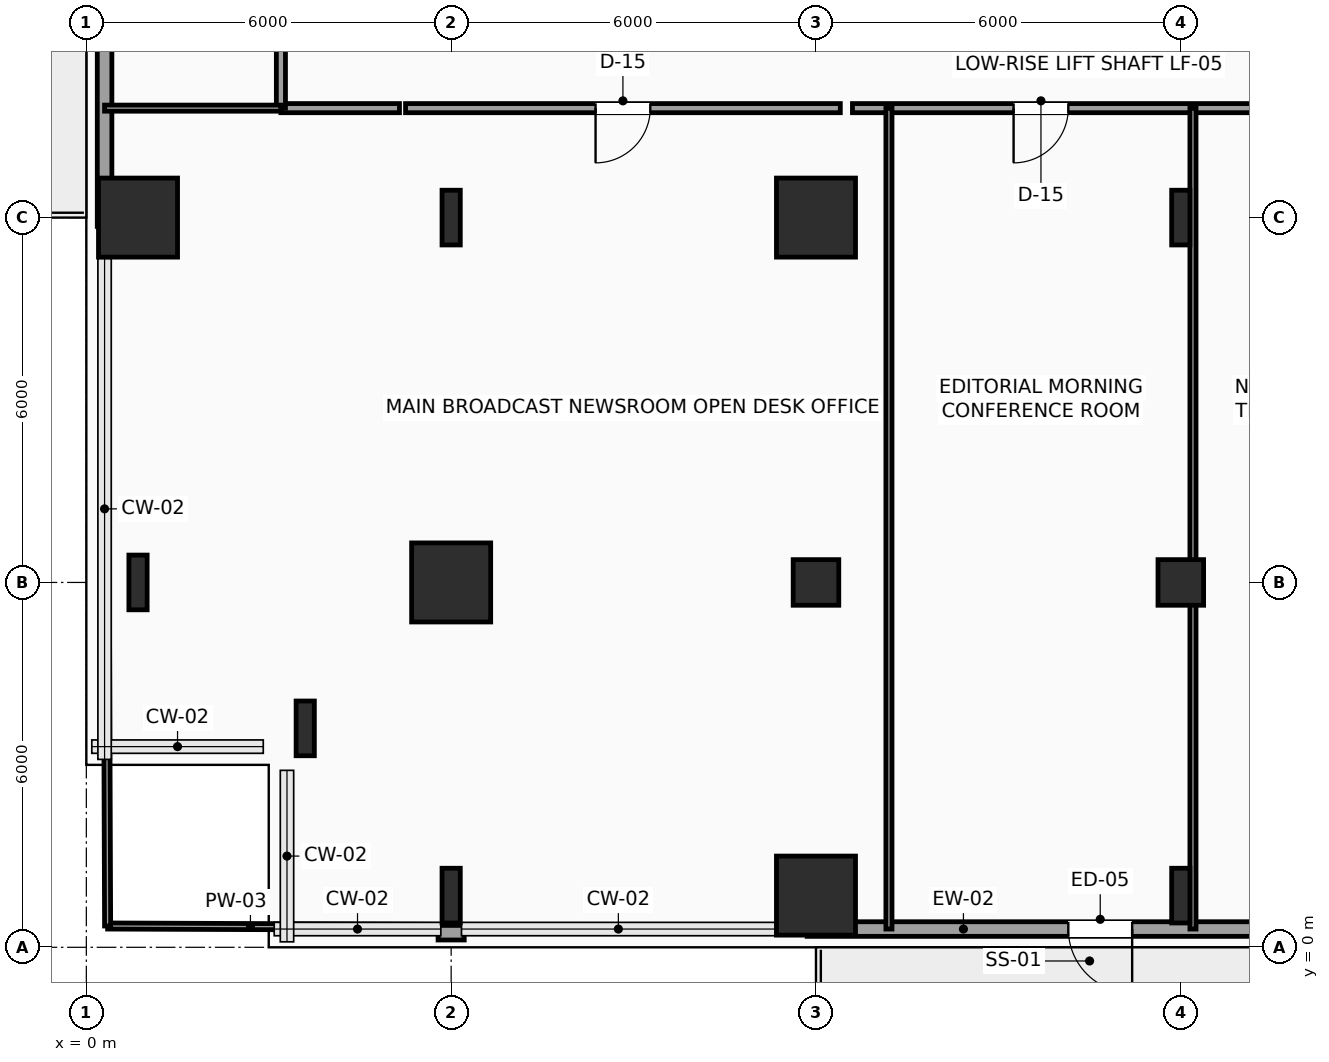
"""IFC4 building model, lengths in metres.
Left out: names, types, materials, properties, quantities, classifications, styles, units other than length and angle.
Written with IfcOpenShell. Run it as: python <this file> out.ifc"""

import sys

from ifc_helpers import new_model, si_unit, direction, frame, frame_2d, origin, origin_2d, place, context, subcontext, project, spatial, rectangle, hollow_rectangle, i_section, extrude, element, fill, save


model = new_model("IFC4")
c1 = context("Model", 3, precision=1e-05, world=origin(), true_north=direction((0.0, 1.0)))
c2 = subcontext(c1, "Body", "Model", "MODEL_VIEW")
j1 = project(units=[si_unit("LENGTHUNIT", "METRE"), si_unit("PLANEANGLEUNIT", "RADIAN")], contexts=[c1])
p1 = place(None, origin())
s1 = spatial("IfcSite", under=j1, at=p1, CompositionType="ELEMENT")
p2 = place(p1, origin())
s2 = spatial("IfcBuilding", under=s1, at=p2, CompositionType="ELEMENT")
p3 = place(p2, frame((0.0, 0.0, 36.3)))
s3 = spatial("IfcBuildingStorey", under=s2, at=p3, CompositionType="ELEMENT", Elevation=36.3)
for number, where, z_axis, x_axis in (
    (1, (3.6, 3.6, 0.0), (0.0, 0.0, 1.0), (1.0, 0.0, 0.0)),
    (2, (0.85, 6.0, 0.0), (0.0, 0.0, 1.0), (1.0, 0.0, 0.0)),
):
    element("IfcColumn", number, at=place(p3, frame(where, z_axis=z_axis, x_axis=x_axis)), inside=s3, PredefinedType="COLUMN", context=c2, shape_type="SweptSolid", body=[
        extrude(i_section(OverallWidth=0.3, OverallDepth=0.9, WebThickness=0.019, FlangeThickness=0.035, FilletRadius=0.03, at=origin_2d()), origin(), (0.0, 0.0, 1.0), 3.9),
    ])
p4 = place(p3, frame((0.85, 12.0, 0.0), z_axis=(0.0, 0.0, 1.0), x_axis=(1.0, 0.0, 0.0)))
e3 = element("IfcColumn", 3, at=p4, inside=s3, PredefinedType="COLUMN", context=c2, shape_type="SweptSolid", body=[
    extrude(rectangle(XDim=1.3, YDim=1.3, at=origin_2d()), origin(), (0.0, 0.0, 1.0), 3.9),
])
p5 = place(p3, frame((6.0, 0.85, 0.0), z_axis=(0.0, 0.0, 1.0), x_axis=(1.0, 0.0, 0.0)))
e4 = element("IfcColumn", 4, at=p5, inside=s3, PredefinedType="COLUMN", context=c2, shape_type="SweptSolid", body=[
    extrude(i_section(OverallWidth=0.3, OverallDepth=0.9, WebThickness=0.019, FlangeThickness=0.035, FilletRadius=0.03, at=origin_2d()), origin(), (0.0, 0.0, 1.0), 3.9),
])
p6 = place(p3, frame((6.0, 6.0, 0.0), z_axis=(0.0, 0.0, 1.0), x_axis=(1.0, 0.0, 0.0)))
e5 = element("IfcColumn", 5, at=p6, inside=s3, PredefinedType="COLUMN", context=c2, shape_type="SweptSolid", body=[
    extrude(rectangle(XDim=1.3, YDim=1.3, at=origin_2d()), origin(), (0.0, 0.0, 1.0), 3.9),
])
p7 = place(p3, frame((6.0, 12.0, 0.0), z_axis=(0.0, 0.0, 1.0), x_axis=(1.0, 0.0, 0.0)))
e6 = element("IfcColumn", 6, at=p7, inside=s3, PredefinedType="COLUMN", context=c2, shape_type="SweptSolid", body=[
    extrude(i_section(OverallWidth=0.3, OverallDepth=0.9, WebThickness=0.019, FlangeThickness=0.035, FilletRadius=0.03, at=origin_2d()), origin(), (0.0, 0.0, 1.0), 3.9),
])
p8 = place(p3, frame((12.0, 0.85, 0.0), z_axis=(0.0, 0.0, 1.0), x_axis=(1.0, 0.0, 0.0)))
e7 = element("IfcColumn", 7, at=p8, inside=s3, PredefinedType="COLUMN", context=c2, shape_type="SweptSolid", body=[
    extrude(rectangle(XDim=1.3, YDim=1.3, at=origin_2d()), origin(), (0.0, 0.0, 1.0), 3.9),
])
p9 = place(p3, frame((12.0, 6.0, 0.0), z_axis=(0.0, 0.0, 1.0), x_axis=(1.0, 0.0, 0.0)))
e8 = element("IfcColumn", 8, at=p9, inside=s3, PredefinedType="COLUMN", context=c2, shape_type="SweptSolid", body=[
    extrude(hollow_rectangle(XDim=0.75, YDim=0.75, WallThickness=0.035, InnerFilletRadius=0.035, OuterFilletRadius=0.05, at=origin_2d()), origin(), (0.0, 0.0, 1.0), 3.9),
])
p10 = place(p3, frame((12.0, 12.0, 0.0), z_axis=(0.0, 0.0, 1.0), x_axis=(1.0, 0.0, 0.0)))
e9 = element("IfcColumn", 9, at=p10, inside=s3, PredefinedType="COLUMN", context=c2, shape_type="SweptSolid", body=[
    extrude(rectangle(XDim=1.3, YDim=1.3, at=origin_2d()), origin(), (0.0, 0.0, 1.0), 3.9),
])
p11 = place(p3, frame((18.0, 0.85, 0.0), z_axis=(0.0, 0.0, 1.0), x_axis=(1.0, 0.0, 0.0)))
e10 = element("IfcColumn", 10, at=p11, inside=s3, PredefinedType="COLUMN", context=c2, shape_type="SweptSolid", body=[
    extrude(i_section(OverallWidth=0.3, OverallDepth=0.9, WebThickness=0.019, FlangeThickness=0.035, FilletRadius=0.03, at=origin_2d()), origin(), (0.0, 0.0, 1.0), 3.9),
])
p12 = place(p3, frame((18.0, 6.0, 0.0), z_axis=(0.0, 0.0, 1.0), x_axis=(1.0, 0.0, 0.0)))
e11 = element("IfcColumn", 11, at=p12, inside=s3, PredefinedType="COLUMN", context=c2, shape_type="SweptSolid", body=[
    extrude(hollow_rectangle(XDim=0.75, YDim=0.75, WallThickness=0.035, InnerFilletRadius=0.035, OuterFilletRadius=0.05, at=origin_2d()), origin(), (0.0, 0.0, 1.0), 3.9),
])
p13 = place(p3, frame((18.0, 12.0, 0.0), z_axis=(0.0, 0.0, 1.0), x_axis=(1.0, 0.0, 0.0)))
e12 = element("IfcColumn", 12, at=p13, inside=s3, PredefinedType="COLUMN", context=c2, shape_type="SweptSolid", body=[
    extrude(i_section(OverallWidth=0.3, OverallDepth=0.9, WebThickness=0.019, FlangeThickness=0.035, FilletRadius=0.03, at=origin_2d()), origin(), (0.0, 0.0, 1.0), 3.9),
])
p14 = place(p3, frame((21.145, 0.3, 0.0), z_axis=(0.0, 0.0, 1.0), x_axis=(-1.0, 0.0, 0.0)))
e13 = element("IfcWall", 13, at=p14, inside=s3, PredefinedType="SOLIDWALL", context=c2, shape_type="SweptSolid", body=[
    extrude(rectangle(XDim=9.29, YDim=0.24, at=frame_2d((4.645, 0.0))), origin(), (0.0, 0.0, 1.0), 3.65),
])
p15 = place(p14, frame((3.945, 0.0, 0.0)))
e14 = element("IfcOpeningElement", 14, at=p15, cuts=e13, PredefinedType="OPENING", context=c2, shape_type="SweptSolid", body=[
    extrude(rectangle(XDim=1.05, YDim=2.2, at=frame_2d((0.525, 1.1))), frame((0.0, 0.13, 0.0), z_axis=(0.0, -1.0, 0.0), x_axis=(1.0, 0.0, 0.0)), (0.0, 0.0, 1.0), 0.26),
])
p16 = place(p3, frame((0.3, 11.855, 0.0), z_axis=(0.0, 0.0, 1.0), x_axis=(0.0, 1.0, 0.0)))
e15 = element("IfcWall", 15, at=p16, inside=s3, PredefinedType="SOLIDWALL", context=c2, shape_type="SweptSolid", body=[
    extrude(rectangle(XDim=9.29, YDim=0.24, at=frame_2d((4.645, 0.0))), origin(), (0.0, 0.0, 1.0), 3.65),
])
p17 = place(p16, frame((3.945, 0.0, 0.0)))
e16 = element("IfcOpeningElement", 16, at=p17, cuts=e15, PredefinedType="OPENING", context=c2, shape_type="SweptSolid", body=[
    extrude(rectangle(XDim=1.05, YDim=2.2, at=frame_2d((0.525, 1.1))), frame((0.0, 0.13, 0.0), z_axis=(0.0, -1.0, 0.0), x_axis=(1.0, 0.0, 0.0)), (0.0, 0.0, 1.0), 0.26),
])
p18 = place(p3, frame((6.215, 0.24, 0.0), z_axis=(0.0, 0.0, 1.0), x_axis=(-1.0, 0.0, 0.0)))
e17 = element("IfcWall", 17, at=p18, inside=s3, PredefinedType="SOLIDWALL", context=c2, shape_type="SweptSolid", body=[
    extrude(rectangle(XDim=0.43, YDim=0.24, at=frame_2d((0.215, 0.0))), origin(), (0.0, 0.0, 1.0), 3.65),
])
p19 = place(p3, frame((21.55, 13.8, 0.0), z_axis=(0.0, 0.0, 1.0), x_axis=(-1.0, 0.0, 0.0)))
e18 = element("IfcWall", 18, at=p19, inside=s3, PredefinedType="PARTITIONING", context=c2, shape_type="SweptSolid", body=[
    extrude(rectangle(XDim=8.95, YDim=0.15, at=frame_2d((4.475, 0.0))), origin(), (0.0, 0.0, 1.0), 3.65),
])
p20 = place(p19, frame((5.4, 0.0, 0.0)))
e19 = element("IfcOpeningElement", 19, at=p20, cuts=e18, PredefinedType="OPENING", context=c2, shape_type="SweptSolid", body=[
    extrude(rectangle(XDim=0.9, YDim=2.1, at=frame_2d((0.45, 1.05))), frame((0.0, 0.085, 0.0), z_axis=(0.0, -1.0, 0.0), x_axis=(1.0, 0.0, 0.0)), (0.0, 0.0, 1.0), 0.17),
])
p21 = place(p19, frame((1.225, 0.0, 0.0)))
e20 = element("IfcOpeningElement", 20, at=p21, cuts=e18, PredefinedType="OPENING", context=c2, shape_type="SweptSolid", body=[
    extrude(rectangle(XDim=0.9, YDim=2.1, at=frame_2d((0.45, 1.05))), frame((0.0, 0.085, 0.0), z_axis=(0.0, -1.0, 0.0), x_axis=(1.0, 0.0, 0.0)), (0.0, 0.0, 1.0), 0.17),
])
p22 = place(p3, frame((12.4, 13.8, 0.0), z_axis=(0.0, 0.0, 1.0), x_axis=(-1.0, 0.0, 0.0)))
e21 = element("IfcWall", 21, at=p22, inside=s3, PredefinedType="PARTITIONING", context=c2, shape_type="SweptSolid", body=[
    extrude(rectangle(XDim=7.15, YDim=0.15, at=frame_2d((3.575, 0.0))), origin(), (0.0, 0.0, 1.0), 3.65),
])
p23 = place(p22, frame((3.125, 0.0, 0.0)))
e22 = element("IfcOpeningElement", 22, at=p23, cuts=e21, PredefinedType="OPENING", context=c2, shape_type="SweptSolid", body=[
    extrude(rectangle(XDim=0.9, YDim=2.1, at=frame_2d((0.45, 1.05))), frame((0.0, 0.085, 0.0), z_axis=(0.0, -1.0, 0.0), x_axis=(1.0, 0.0, 0.0)), (0.0, 0.0, 1.0), 0.17),
])
p24 = place(p3, frame((5.15, 13.8, 0.0), z_axis=(0.0, 0.0, 1.0), x_axis=(-1.0, 0.0, 0.0)))
e23 = element("IfcWall", 23, at=p24, inside=s3, PredefinedType="PARTITIONING", context=c2, shape_type="SweptSolid", body=[
    extrude(rectangle(XDim=1.95, YDim=0.15, at=frame_2d((0.975, 0.0))), origin(), (0.0, 0.0, 1.0), 3.65),
])
p25 = place(p3, frame((3.2, 13.8, 0.0), z_axis=(0.0, 0.0, 1.0), x_axis=(0.0, 1.0, 0.0)))
e24 = element("IfcWall", 24, at=p25, inside=s3, PredefinedType="PARTITIONING", context=c2, shape_type="SweptSolid", body=[
    extrude(rectangle(XDim=16.45, YDim=0.15, at=frame_2d((8.225, 0.0))), origin(), (0.0, 0.0, 1.0), 3.65),
])
p26 = place(p25, frame((2.65, 0.0, 0.0)))
e25 = element("IfcOpeningElement", 25, at=p26, cuts=e24, PredefinedType="OPENING", context=c2, shape_type="SweptSolid", body=[
    extrude(rectangle(XDim=0.9, YDim=2.1, at=frame_2d((0.45, 1.05))), frame((0.0, 0.085, 0.0), z_axis=(0.0, -1.0, 0.0), x_axis=(1.0, 0.0, 0.0)), (0.0, 0.0, 1.0), 0.17),
])
p27 = place(p25, frame((8.85, 0.0, 0.0)))
e26 = element("IfcOpeningElement", 26, at=p27, cuts=e24, PredefinedType="OPENING", context=c2, shape_type="SweptSolid", body=[
    extrude(rectangle(XDim=0.9, YDim=2.1, at=frame_2d((0.45, 1.05))), frame((0.0, 0.085, 0.0), z_axis=(0.0, -1.0, 0.0), x_axis=(1.0, 0.0, 0.0)), (0.0, 0.0, 1.0), 0.17),
])
p28 = place(p25, frame((13.975, 0.0, 0.0)))
e27 = element("IfcOpeningElement", 27, at=p28, cuts=e24, PredefinedType="OPENING", context=c2, shape_type="SweptSolid", body=[
    extrude(rectangle(XDim=0.9, YDim=2.1, at=frame_2d((0.45, 1.05))), frame((0.0, 0.085, 0.0), z_axis=(0.0, -1.0, 0.0), x_axis=(1.0, 0.0, 0.0)), (0.0, 0.0, 1.0), 0.17),
])
p29 = place(p3, frame((0.35, 0.35, 0.0), z_axis=(0.0, 0.0, 1.0), x_axis=(0.999992363151, -0.003908150379, 0.0)))
e28 = element("IfcWall", 28, at=p29, inside=s3, PredefinedType="PARTITIONING", context=c2, shape_type="SweptSolid", body=[
    extrude(rectangle(XDim=5.435, YDim=0.1, at=frame_2d((2.717, 0.0))), origin(), (0.0, 0.0, 1.0), 3.65),
])
p30 = place(p3, frame((6.215, 0.327, 0.0), z_axis=(0.0, 0.0, 1.0), x_axis=(0.999992410931, -0.003895905674, 0.0)))
e29 = element("IfcWall", 29, at=p30, inside=s3, PredefinedType="PARTITIONING", context=c2, shape_type="SweptSolid", body=[
    extrude(rectangle(XDim=5.64, YDim=0.1, at=frame_2d((2.82, 0.0))), origin(), (0.0, 0.0, 1.0), 3.65),
])
p31 = place(p3, frame((0.35, 0.35, 0.0), z_axis=(0.0, 0.0, 1.0), x_axis=(-0.003734801216, 0.999993025606, 0.0)))
e30 = element("IfcWall", 30, at=p31, inside=s3, PredefinedType="PARTITIONING", context=c2, shape_type="SweptSolid", body=[
    extrude(rectangle(XDim=11.505, YDim=0.1, at=frame_2d((5.752, 0.0))), origin(), (0.0, 0.0, 1.0), 3.65),
])
p32 = place(p3, frame((13.2, 0.3, 0.0), z_axis=(0.0, 0.0, 1.0), x_axis=(0.0, 1.0, 0.0)))
e31 = element("IfcWall", 31, at=p32, inside=s3, PredefinedType="PARTITIONING", context=c2, shape_type="SweptSolid", body=[
    extrude(rectangle(XDim=13.5, YDim=0.1, at=frame_2d((6.75, 0.0))), origin(), (0.0, 0.0, 1.0), 3.65),
])
p33 = place(p3, frame((18.2, 0.3, 0.0), z_axis=(0.0, 0.0, 1.0), x_axis=(0.0, 1.0, 0.0)))
e32 = element("IfcWall", 32, at=p33, inside=s3, PredefinedType="PARTITIONING", context=c2, shape_type="SweptSolid", body=[
    extrude(rectangle(XDim=13.5, YDim=0.1, at=frame_2d((6.75, 0.0))), origin(), (0.0, 0.0, 1.0), 2.992),
])
p34 = place(p3, frame((0.3, 13.8, 0.0), z_axis=(0.0, 0.0, 1.0), x_axis=(1.0, 0.0, 0.0)))
e33 = element("IfcWall", 33, at=p34, inside=s3, PredefinedType="PARTITIONING", context=c2, shape_type="SweptSolid", body=[
    extrude(rectangle(XDim=2.9, YDim=0.1, at=frame_2d((1.45, 0.0))), origin(), (0.0, 0.0, 1.0), 3.65),
])
p35 = place(p15, origin())
e34 = element("IfcDoor", 34, at=p35, inside=s3, OperationType="SINGLE_SWING_LEFT", PredefinedType="DOOR", context=c2, shape_type="SweptSolid", body=[
    extrude(rectangle(XDim=1.05, YDim=2.2, at=frame_2d((0.525, 1.1))), frame((0.0, 0.025, 0.0), z_axis=(0.0, -1.0, 0.0), x_axis=(1.0, 0.0, 0.0)), (0.0, 0.0, 1.0), 0.05),
])
fill(e14, e34)
p36 = place(p20, origin())
e35 = element("IfcDoor", 35, at=p36, inside=s3, OperationType="SINGLE_SWING_RIGHT", PredefinedType="DOOR", context=c2, shape_type="SweptSolid", body=[
    extrude(rectangle(XDim=0.9, YDim=2.1, at=frame_2d((0.45, 1.05))), frame((0.0, 0.025, 0.0), z_axis=(0.0, -1.0, 0.0), x_axis=(1.0, 0.0, 0.0)), (0.0, 0.0, 1.0), 0.05),
])
fill(e19, e35)
p37 = place(p23, origin())
e36 = element("IfcDoor", 36, at=p37, inside=s3, OperationType="SINGLE_SWING_RIGHT", PredefinedType="DOOR", context=c2, shape_type="SweptSolid", body=[
    extrude(rectangle(XDim=0.9, YDim=2.1, at=frame_2d((0.45, 1.05))), frame((0.0, 0.025, 0.0), z_axis=(0.0, -1.0, 0.0), x_axis=(1.0, 0.0, 0.0)), (0.0, 0.0, 1.0), 0.05),
])
fill(e22, e36)
save(model, sys.argv[1])
